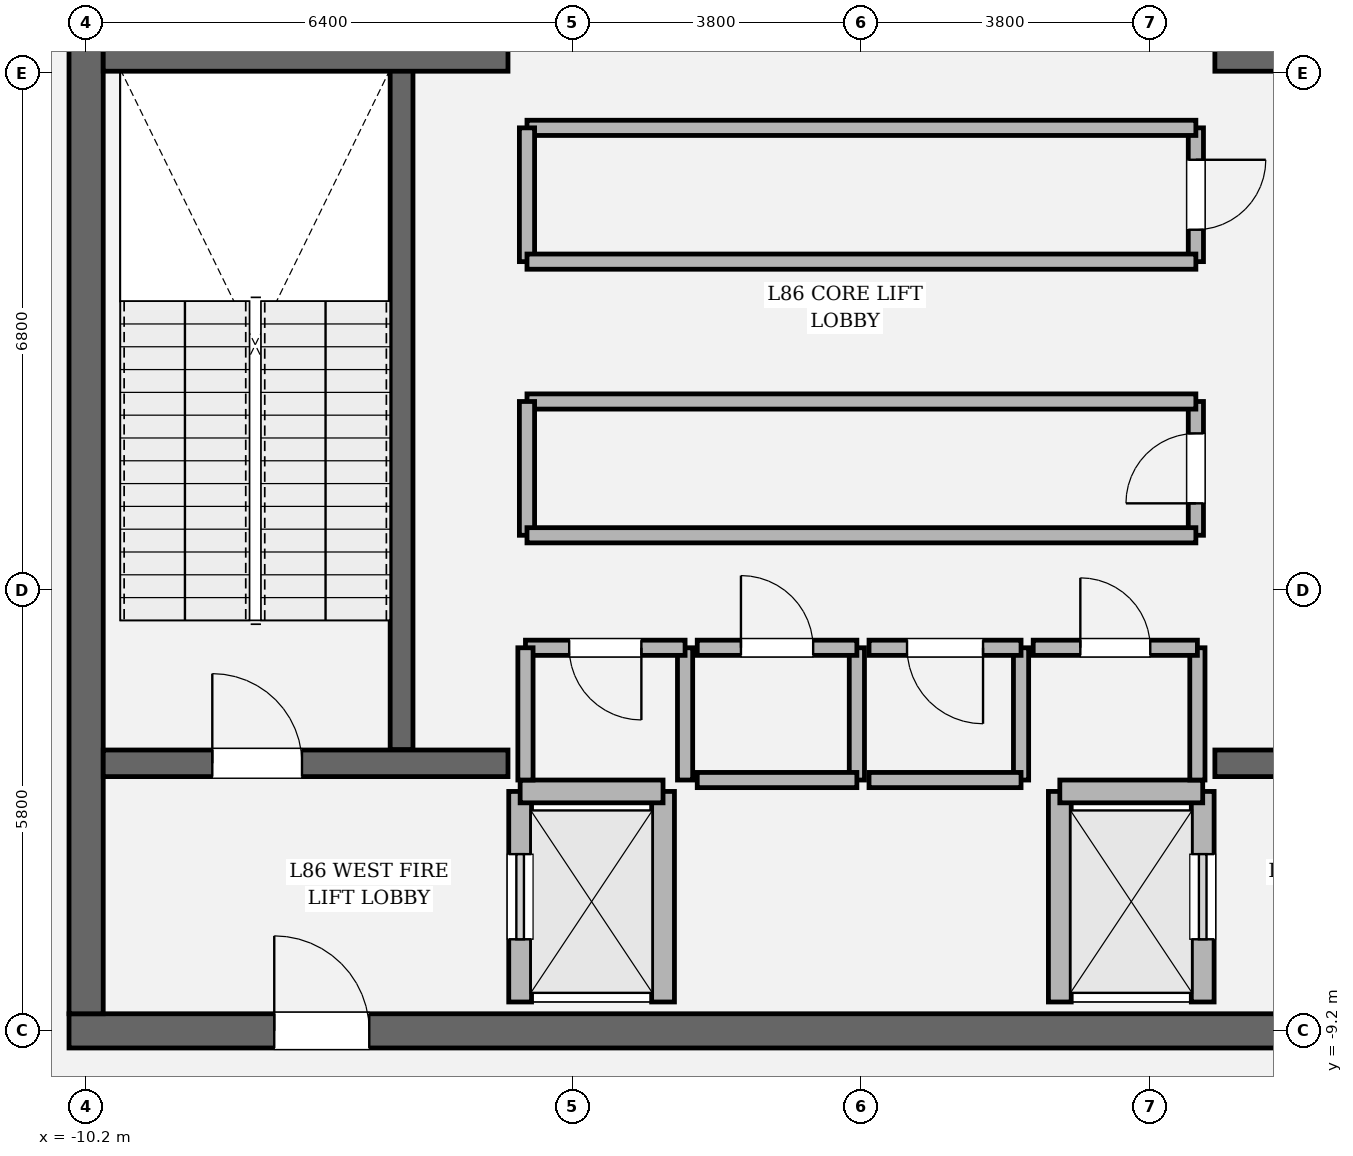
"""IFC4 building model, lengths in metres.
Left out: names, types, materials, properties, quantities, classifications, styles, units other than length and angle.
Written with IfcOpenShell. Run it as: python <this file> out.ifc"""

import sys

from ifc_helpers import new_model, si_unit, direction, frame, frame_2d, origin, place, context, subcontext, project, spatial, rectangle, extrude, element, fill, save


model = new_model("IFC4")
c1 = context("Model", 3, precision=1e-05, world=origin(), true_north=direction((0.0, 1.0)))
c2 = subcontext(c1, "Body", "Model", "MODEL_VIEW")
j1 = project(units=[si_unit("LENGTHUNIT", "METRE"), si_unit("PLANEANGLEUNIT", "RADIAN")], contexts=[c1])
p1 = place(None, origin())
s1 = spatial("IfcSite", under=j1, at=p1, CompositionType="ELEMENT")
p2 = place(p1, origin())
s2 = spatial("IfcBuilding", under=s1, at=p2, CompositionType="ELEMENT")
p3 = place(p2, frame((0.0, 0.0, 366.3)))
s3 = spatial("IfcBuildingStorey", under=s2, at=p3, CompositionType="ELEMENT", Elevation=366.3)
p4 = place(p3, frame((10.425, -9.2, 0.0), z_axis=(0.0, 0.0, 1.0), x_axis=(-1.0, 0.0, 0.0)))
e1 = element("IfcWall", 1, at=p4, inside=s3, PredefinedType="SHEAR", context=c2, shape_type="SweptSolid", body=[
    extrude(rectangle(XDim=20.85, YDim=0.45, at=frame_2d((10.425, 0.0))), origin(), (0.0, 0.0, 1.0), 4.5),
])
p5 = place(p4, frame((2.7, 0.0, 0.0)))
e2 = element("IfcOpeningElement", 2, at=p5, cuts=e1, PredefinedType="OPENING", context=c2, shape_type="SweptSolid", body=[
    extrude(rectangle(XDim=1.25, YDim=2.25, at=frame_2d((0.625, 1.125))), frame((0.0, 0.235, 0.0), z_axis=(0.0, -1.0, 0.0), x_axis=(1.0, 0.0, 0.0)), (0.0, 0.0, 1.0), 0.47),
])
p6 = place(p4, frame((16.9, 0.0, 0.0)))
e3 = element("IfcOpeningElement", 3, at=p6, cuts=e1, PredefinedType="OPENING", context=c2, shape_type="SweptSolid", body=[
    extrude(rectangle(XDim=1.25, YDim=2.25, at=frame_2d((0.625, 1.125))), frame((0.0, 0.235, 0.0), z_axis=(0.0, -1.0, 0.0), x_axis=(1.0, 0.0, 0.0)), (0.0, 0.0, 1.0), 0.47),
])
p7 = place(p3, frame((-10.2, -8.975, 0.0), z_axis=(0.0, 0.0, 1.0), x_axis=(0.0, 1.0, 0.0)))
e4 = element("IfcWall", 4, at=p7, inside=s3, PredefinedType="SHEAR", context=c2, shape_type="SweptSolid", body=[
    extrude(rectangle(XDim=17.95, YDim=0.45, at=frame_2d((8.975, 0.0))), origin(), (0.0, 0.0, 1.0), 4.5),
])
p8 = place(p7, frame((12.765, 0.0, 0.0)))
e5 = element("IfcOpeningElement", 5, at=p8, cuts=e4, PredefinedType="OPENING", context=c2, shape_type="SweptSolid", body=[
    extrude(rectangle(XDim=1.18, YDim=2.2, at=frame_2d((0.59, 1.1))), frame((0.0, 0.235, 0.0), z_axis=(0.0, -1.0, 0.0), x_axis=(1.0, 0.0, 0.0)), (0.0, 0.0, 1.0), 0.47),
])
p9 = place(p3, frame((-6.05, -5.5, 0.0), z_axis=(0.0, 0.0, 1.0), x_axis=(0.0, 1.0, 0.0)))
e6 = element("IfcWall", 6, at=p9, inside=s3, PredefinedType="SOLIDWALL", context=c2, shape_type="SweptSolid", body=[
    extrude(rectangle(XDim=8.95, YDim=0.3, at=frame_2d((4.475, 0.0))), origin(), (0.0, 0.0, 1.0), 4.5),
])
p10 = place(p3, frame((-9.975, -5.68, 0.0), z_axis=(0.0, 0.0, 1.0), x_axis=(1.0, 0.0, 0.0)))
e7 = element("IfcWall", 7, at=p10, inside=s3, PredefinedType="SOLIDWALL", context=c2, shape_type="SweptSolid", body=[
    extrude(rectangle(XDim=5.325, YDim=0.35, at=frame_2d((2.663, 0.0))), origin(), (0.0, 0.0, 1.0), 4.5),
])
p11 = place(p10, frame((1.435, 0.0, 0.0)))
e8 = element("IfcOpeningElement", 8, at=p11, cuts=e7, PredefinedType="OPENING", context=c2, shape_type="SweptSolid", body=[
    extrude(rectangle(XDim=1.18, YDim=2.2, at=frame_2d((0.59, 1.1))), frame((0.0, 0.185, 0.0), z_axis=(0.0, -1.0, 0.0), x_axis=(1.0, 0.0, 0.0)), (0.0, 0.0, 1.0), 0.37),
])
p12 = place(p3, frame((4.65, -5.68, 0.0), z_axis=(0.0, 0.0, 1.0), x_axis=(1.0, 0.0, 0.0)))
e9 = element("IfcWall", 9, at=p12, inside=s3, PredefinedType="SOLIDWALL", context=c2, shape_type="SweptSolid", body=[
    extrude(rectangle(XDim=5.325, YDim=0.35, at=frame_2d((2.663, 0.0))), origin(), (0.0, 0.0, 1.0), 4.5),
])
p13 = place(p12, frame((2.71, 0.0, 0.0)))
e10 = element("IfcOpeningElement", 10, at=p13, cuts=e9, PredefinedType="OPENING", context=c2, shape_type="SweptSolid", body=[
    extrude(rectangle(XDim=1.18, YDim=2.2, at=frame_2d((0.59, 1.1))), frame((0.0, 0.185, 0.0), z_axis=(0.0, -1.0, 0.0), x_axis=(1.0, 0.0, 0.0)), (0.0, 0.0, 1.0), 0.37),
])
for number, where, z_axis, x_axis in (
    (11, (-9.975, 3.6, 0.0), (0.0, 0.0, 1.0), (1.0, 0.0, 0.0)),
    (12, (4.65, 3.6, 0.0), (0.0, 0.0, 1.0), (1.0, 0.0, 0.0)),
):
    element("IfcWall", number, at=place(p3, frame(where, z_axis=z_axis, x_axis=x_axis)), inside=s3, PredefinedType="SOLIDWALL", context=c2, shape_type="SweptSolid", body=[
        extrude(rectangle(XDim=5.325, YDim=0.35, at=frame_2d((2.663, 0.0))), origin(), (0.0, 0.0, 1.0), 4.5),
    ])
p14 = place(p3, frame((-4.49, -8.82, 0.0), z_axis=(0.0, 0.0, 1.0), x_axis=(0.0, 1.0, 0.0)))
e13 = element("IfcWall", 13, at=p14, inside=s3, PredefinedType="SOLIDWALL", context=c2, shape_type="SweptSolid", body=[
    extrude(rectangle(XDim=2.77, YDim=0.3, at=frame_2d((1.385, 0.0))), origin(), (0.0, 0.0, 1.0), 4.25),
])
p15 = place(p14, frame((0.825, 0.0, 0.0)))
e14 = element("IfcOpeningElement", 14, at=p15, cuts=e13, PredefinedType="OPENING", context=c2, shape_type="SweptSolid", body=[
    extrude(rectangle(XDim=1.12, YDim=2.25, at=frame_2d((0.56, 1.125))), frame((0.0, 0.16, 0.0), z_axis=(0.0, -1.0, 0.0), x_axis=(1.0, 0.0, 0.0)), (0.0, 0.0, 1.0), 0.32),
])
p16 = place(p3, frame((-2.61, -8.82, 0.0), z_axis=(0.0, 0.0, 1.0), x_axis=(0.0, 1.0, 0.0)))
e15 = element("IfcWall", 15, at=p16, inside=s3, PredefinedType="SOLIDWALL", context=c2, shape_type="SweptSolid", body=[
    extrude(rectangle(XDim=2.77, YDim=0.3, at=frame_2d((1.385, 0.0))), origin(), (0.0, 0.0, 1.0), 4.25),
])
p17 = place(p3, frame((-4.49, -6.05, 0.0), z_axis=(0.0, 0.0, 1.0), x_axis=(1.0, 0.0, 0.0)))
e16 = element("IfcWall", 16, at=p17, inside=s3, PredefinedType="SOLIDWALL", context=c2, shape_type="SweptSolid", body=[
    extrude(rectangle(XDim=1.88, YDim=0.3, at=frame_2d((0.94, 0.0))), origin(), (0.0, 0.0, 1.0), 4.25),
])
p18 = place(p3, frame((4.49, -8.82, 0.0), z_axis=(0.0, 0.0, 1.0), x_axis=(0.0, 1.0, 0.0)))
e17 = element("IfcWall", 17, at=p18, inside=s3, PredefinedType="SOLIDWALL", context=c2, shape_type="SweptSolid", body=[
    extrude(rectangle(XDim=2.77, YDim=0.3, at=frame_2d((1.385, 0.0))), origin(), (0.0, 0.0, 1.0), 4.25),
])
p19 = place(p18, frame((0.825, 0.0, 0.0)))
e18 = element("IfcOpeningElement", 18, at=p19, cuts=e17, PredefinedType="OPENING", context=c2, shape_type="SweptSolid", body=[
    extrude(rectangle(XDim=1.12, YDim=2.25, at=frame_2d((0.56, 1.125))), frame((0.0, 0.16, 0.0), z_axis=(0.0, -1.0, 0.0), x_axis=(1.0, 0.0, 0.0)), (0.0, 0.0, 1.0), 0.32),
])
p20 = place(p3, frame((2.61, -8.82, 0.0), z_axis=(0.0, 0.0, 1.0), x_axis=(0.0, 1.0, 0.0)))
e19 = element("IfcWall", 19, at=p20, inside=s3, PredefinedType="SOLIDWALL", context=c2, shape_type="SweptSolid", body=[
    extrude(rectangle(XDim=2.77, YDim=0.3, at=frame_2d((1.385, 0.0))), origin(), (0.0, 0.0, 1.0), 4.25),
])
p21 = place(p3, frame((2.61, -6.05, 0.0), z_axis=(0.0, 0.0, 1.0), x_axis=(1.0, 0.0, 0.0)))
e20 = element("IfcWall", 20, at=p21, inside=s3, PredefinedType="SOLIDWALL", context=c2, shape_type="SweptSolid", body=[
    extrude(rectangle(XDim=1.88, YDim=0.3, at=frame_2d((0.94, 0.0))), origin(), (0.0, 0.0, 1.0), 4.25),
])
p22 = place(p3, frame((-2.32, -5.9, 0.0), z_axis=(0.0, 0.0, 1.0), x_axis=(0.0, 1.0, 0.0)))
e21 = element("IfcWall", 21, at=p22, inside=s3, PredefinedType="SOLIDWALL", context=c2, shape_type="SweptSolid", body=[
    extrude(rectangle(XDim=1.74, YDim=0.2, at=frame_2d((0.87, 0.0))), origin(), (0.0, 0.0, 1.0), 4.25),
])
p23 = place(p3, frame((-2.32, -4.16, 0.0), z_axis=(0.0, 0.0, 1.0), x_axis=(-1.0, 0.0, 0.0)))
e22 = element("IfcWall", 22, at=p23, inside=s3, PredefinedType="SOLIDWALL", context=c2, shape_type="SweptSolid", body=[
    extrude(rectangle(XDim=2.1, YDim=0.2, at=frame_2d((1.05, 0.0))), origin(), (0.0, 0.0, 1.0), 4.25),
])
p24 = place(p23, frame((0.575, 0.0, 0.0)))
e23 = element("IfcOpeningElement", 23, at=p24, cuts=e22, PredefinedType="OPENING", context=c2, shape_type="SweptSolid", body=[
    extrude(rectangle(XDim=0.95, YDim=2.15, at=frame_2d((0.475, 1.075))), frame((0.0, 0.11, 0.0), z_axis=(0.0, -1.0, 0.0), x_axis=(1.0, 0.0, 0.0)), (0.0, 0.0, 1.0), 0.22),
])
for number, where, z_axis, x_axis in (
    (24, (-4.42, -4.16, 0.0), (0.0, 0.0, 1.0), (0.0, -1.0, 0.0)),
    (25, (-0.06, -5.9, 0.0), (0.0, 0.0, 1.0), (0.0, 1.0, 0.0)),
):
    element("IfcWall", number, at=place(p3, frame(where, z_axis=z_axis, x_axis=x_axis)), inside=s3, PredefinedType="SOLIDWALL", context=c2, shape_type="SweptSolid", body=[
        extrude(rectangle(XDim=1.74, YDim=0.2, at=frame_2d((0.87, 0.0))), origin(), (0.0, 0.0, 1.0), 4.25),
    ])
p25 = place(p3, frame((-0.06, -4.16, 0.0), z_axis=(0.0, 0.0, 1.0), x_axis=(-1.0, 0.0, 0.0)))
e26 = element("IfcWall", 26, at=p25, inside=s3, PredefinedType="SOLIDWALL", context=c2, shape_type="SweptSolid", body=[
    extrude(rectangle(XDim=2.1, YDim=0.2, at=frame_2d((1.05, 0.0))), origin(), (0.0, 0.0, 1.0), 4.25),
])
p26 = place(p25, frame((0.575, 0.0, 0.0)))
e27 = element("IfcOpeningElement", 27, at=p26, cuts=e26, PredefinedType="OPENING", context=c2, shape_type="SweptSolid", body=[
    extrude(rectangle(XDim=0.95, YDim=2.15, at=frame_2d((0.475, 1.075))), frame((0.0, 0.11, 0.0), z_axis=(0.0, -1.0, 0.0), x_axis=(1.0, 0.0, 0.0)), (0.0, 0.0, 1.0), 0.22),
])
p27 = place(p3, frame((-2.16, -5.9, 0.0), z_axis=(0.0, 0.0, 1.0), x_axis=(1.0, 0.0, 0.0)))
e28 = element("IfcWall", 28, at=p27, inside=s3, PredefinedType="SOLIDWALL", context=c2, shape_type="SweptSolid", body=[
    extrude(rectangle(XDim=2.1, YDim=0.2, at=frame_2d((1.05, 0.0))), origin(), (0.0, 0.0, 1.0), 4.25),
])
p28 = place(p3, frame((2.1, -5.9, 0.0), z_axis=(0.0, 0.0, 1.0), x_axis=(0.0, 1.0, 0.0)))
e29 = element("IfcWall", 29, at=p28, inside=s3, PredefinedType="SOLIDWALL", context=c2, shape_type="SweptSolid", body=[
    extrude(rectangle(XDim=1.74, YDim=0.2, at=frame_2d((0.87, 0.0))), origin(), (0.0, 0.0, 1.0), 4.25),
])
p29 = place(p3, frame((2.1, -4.16, 0.0), z_axis=(0.0, 0.0, 1.0), x_axis=(-1.0, 0.0, 0.0)))
e30 = element("IfcWall", 30, at=p29, inside=s3, PredefinedType="SOLIDWALL", context=c2, shape_type="SweptSolid", body=[
    extrude(rectangle(XDim=2.0, YDim=0.2, at=frame_2d((1.0, 0.0))), origin(), (0.0, 0.0, 1.0), 4.25),
])
p30 = place(p29, frame((0.5, 0.0, 0.0)))
e31 = element("IfcOpeningElement", 31, at=p30, cuts=e30, PredefinedType="OPENING", context=c2, shape_type="SweptSolid", body=[
    extrude(rectangle(XDim=1.0, YDim=2.15, at=frame_2d((0.5, 1.075))), frame((0.0, 0.11, 0.0), z_axis=(0.0, -1.0, 0.0), x_axis=(1.0, 0.0, 0.0)), (0.0, 0.0, 1.0), 0.22),
])
p31 = place(p3, frame((0.1, -5.9, 0.0), z_axis=(0.0, 0.0, 1.0), x_axis=(1.0, 0.0, 0.0)))
e32 = element("IfcWall", 32, at=p31, inside=s3, PredefinedType="SOLIDWALL", context=c2, shape_type="SweptSolid", body=[
    extrude(rectangle(XDim=2.0, YDim=0.2, at=frame_2d((1.0, 0.0))), origin(), (0.0, 0.0, 1.0), 4.25),
])
p32 = place(p3, frame((4.42, -5.9, 0.0), z_axis=(0.0, 0.0, 1.0), x_axis=(0.0, 1.0, 0.0)))
e33 = element("IfcWall", 33, at=p32, inside=s3, PredefinedType="SOLIDWALL", context=c2, shape_type="SweptSolid", body=[
    extrude(rectangle(XDim=1.74, YDim=0.2, at=frame_2d((0.87, 0.0))), origin(), (0.0, 0.0, 1.0), 4.25),
])
p33 = place(p3, frame((4.42, -4.16, 0.0), z_axis=(0.0, 0.0, 1.0), x_axis=(-1.0, 0.0, 0.0)))
e34 = element("IfcWall", 34, at=p33, inside=s3, PredefinedType="SOLIDWALL", context=c2, shape_type="SweptSolid", body=[
    extrude(rectangle(XDim=2.16, YDim=0.2, at=frame_2d((1.08, 0.0))), origin(), (0.0, 0.0, 1.0), 4.25),
])
p34 = place(p33, frame((0.62, 0.0, 0.0)))
e35 = element("IfcOpeningElement", 35, at=p34, cuts=e34, PredefinedType="OPENING", context=c2, shape_type="SweptSolid", body=[
    extrude(rectangle(XDim=0.92, YDim=2.1, at=frame_2d((0.46, 1.05))), frame((0.0, 0.11, 0.0), z_axis=(0.0, -1.0, 0.0), x_axis=(1.0, 0.0, 0.0)), (0.0, 0.0, 1.0), 0.22),
])
p35 = place(p3, frame((4.4, -2.68, 0.0), z_axis=(0.0, 0.0, 1.0), x_axis=(0.0, 1.0, 0.0)))
e36 = element("IfcWall", 36, at=p35, inside=s3, PredefinedType="SOLIDWALL", context=c2, shape_type="SweptSolid", body=[
    extrude(rectangle(XDim=1.76, YDim=0.2, at=frame_2d((0.88, 0.0))), origin(), (0.0, 0.0, 1.0), 4.25),
])
p36 = place(p35, frame((0.42, 0.0, 0.0)))
e37 = element("IfcOpeningElement", 37, at=p36, cuts=e36, PredefinedType="OPENING", context=c2, shape_type="SweptSolid", body=[
    extrude(rectangle(XDim=0.92, YDim=2.1, at=frame_2d((0.46, 1.05))), frame((0.0, 0.11, 0.0), z_axis=(0.0, -1.0, 0.0), x_axis=(1.0, 0.0, 0.0)), (0.0, 0.0, 1.0), 0.22),
])
p37 = place(p3, frame((4.4, -0.92, 0.0), z_axis=(0.0, 0.0, 1.0), x_axis=(-1.0, 0.0, 0.0)))
e38 = element("IfcWall", 38, at=p37, inside=s3, PredefinedType="SOLIDWALL", context=c2, shape_type="SweptSolid", body=[
    extrude(rectangle(XDim=8.8, YDim=0.2, at=frame_2d((4.4, 0.0))), origin(), (0.0, 0.0, 1.0), 4.25),
])
p38 = place(p3, frame((-4.4, -0.92, 0.0), z_axis=(0.0, 0.0, 1.0), x_axis=(0.0, -1.0, 0.0)))
e39 = element("IfcWall", 39, at=p38, inside=s3, PredefinedType="SOLIDWALL", context=c2, shape_type="SweptSolid", body=[
    extrude(rectangle(XDim=1.76, YDim=0.2, at=frame_2d((0.88, 0.0))), origin(), (0.0, 0.0, 1.0), 4.25),
])
p39 = place(p3, frame((-4.4, -2.68, 0.0), z_axis=(0.0, 0.0, 1.0), x_axis=(1.0, 0.0, 0.0)))
e40 = element("IfcWall", 40, at=p39, inside=s3, PredefinedType="SOLIDWALL", context=c2, shape_type="SweptSolid", body=[
    extrude(rectangle(XDim=8.8, YDim=0.2, at=frame_2d((4.4, 0.0))), origin(), (0.0, 0.0, 1.0), 4.25),
])
p40 = place(p3, frame((4.4, 0.92, 0.0), z_axis=(0.0, 0.0, 1.0), x_axis=(0.0, 1.0, 0.0)))
e41 = element("IfcWall", 41, at=p40, inside=s3, PredefinedType="SOLIDWALL", context=c2, shape_type="SweptSolid", body=[
    extrude(rectangle(XDim=1.76, YDim=0.2, at=frame_2d((0.88, 0.0))), origin(), (0.0, 0.0, 1.0), 4.25),
])
p41 = place(p40, frame((0.42, 0.0, 0.0)))
e42 = element("IfcOpeningElement", 42, at=p41, cuts=e41, PredefinedType="OPENING", context=c2, shape_type="SweptSolid", body=[
    extrude(rectangle(XDim=0.92, YDim=2.1, at=frame_2d((0.46, 1.05))), frame((0.0, 0.11, 0.0), z_axis=(0.0, -1.0, 0.0), x_axis=(1.0, 0.0, 0.0)), (0.0, 0.0, 1.0), 0.22),
])
p42 = place(p3, frame((4.4, 2.68, 0.0), z_axis=(0.0, 0.0, 1.0), x_axis=(-1.0, 0.0, 0.0)))
e43 = element("IfcWall", 43, at=p42, inside=s3, PredefinedType="SOLIDWALL", context=c2, shape_type="SweptSolid", body=[
    extrude(rectangle(XDim=8.8, YDim=0.2, at=frame_2d((4.4, 0.0))), origin(), (0.0, 0.0, 1.0), 4.25),
])
p43 = place(p3, frame((-4.4, 2.68, 0.0), z_axis=(0.0, 0.0, 1.0), x_axis=(0.0, -1.0, 0.0)))
e44 = element("IfcWall", 44, at=p43, inside=s3, PredefinedType="SOLIDWALL", context=c2, shape_type="SweptSolid", body=[
    extrude(rectangle(XDim=1.76, YDim=0.2, at=frame_2d((0.88, 0.0))), origin(), (0.0, 0.0, 1.0), 4.25),
])
p44 = place(p3, frame((-4.4, 0.92, 0.0), z_axis=(0.0, 0.0, 1.0), x_axis=(1.0, 0.0, 0.0)))
e45 = element("IfcWall", 45, at=p44, inside=s3, PredefinedType="SOLIDWALL", context=c2, shape_type="SweptSolid", body=[
    extrude(rectangle(XDim=8.8, YDim=0.2, at=frame_2d((4.4, 0.0))), origin(), (0.0, 0.0, 1.0), 4.25),
])
p45 = place(p11, origin())
e46 = element("IfcDoor", 46, at=p45, inside=s3, OperationType="SINGLE_SWING_LEFT", PredefinedType="DOOR", context=c2, shape_type="SweptSolid", body=[
    extrude(rectangle(XDim=1.18, YDim=2.2, at=frame_2d((0.59, 1.1))), frame((0.0, 0.025, 0.0), z_axis=(0.0, -1.0, 0.0), x_axis=(1.0, 0.0, 0.0)), (0.0, 0.0, 1.0), 0.05),
])
fill(e8, e46)
p46 = place(p6, origin())
e47 = element("IfcDoor", 47, at=p46, inside=s3, OperationType="SINGLE_SWING_RIGHT", PredefinedType="DOOR", context=c2, shape_type="SweptSolid", body=[
    extrude(rectangle(XDim=1.25, YDim=2.25, at=frame_2d((0.625, 1.125))), frame((0.0, 0.025, 0.0), z_axis=(0.0, -1.0, 0.0), x_axis=(1.0, 0.0, 0.0)), (0.0, 0.0, 1.0), 0.05),
])
fill(e3, e47)
p47 = place(p15, origin())
e48 = element("IfcDoor", 48, at=p47, inside=s3, OperationType="SLIDING_TO_LEFT", PredefinedType="DOOR", context=c2, shape_type="SweptSolid", body=[
    extrude(rectangle(XDim=1.12, YDim=2.25, at=frame_2d((0.56, 1.125))), frame((0.0, 0.025, 0.0), z_axis=(0.0, -1.0, 0.0), x_axis=(1.0, 0.0, 0.0)), (0.0, 0.0, 1.0), 0.05),
])
fill(e14, e48)
p48 = place(p19, origin())
e49 = element("IfcDoor", 49, at=p48, inside=s3, OperationType="SLIDING_TO_RIGHT", PredefinedType="DOOR", context=c2, shape_type="SweptSolid", body=[
    extrude(rectangle(XDim=1.12, YDim=2.25, at=frame_2d((0.56, 1.125))), frame((0.0, 0.025, 0.0), z_axis=(0.0, -1.0, 0.0), x_axis=(1.0, 0.0, 0.0)), (0.0, 0.0, 1.0), 0.05),
])
fill(e18, e49)
p49 = place(p24, origin())
e50 = element("IfcDoor", 50, at=p49, inside=s3, OperationType="SINGLE_SWING_LEFT", PredefinedType="DOOR", context=c2, shape_type="SweptSolid", body=[
    extrude(rectangle(XDim=0.95, YDim=2.15, at=frame_2d((0.475, 1.075))), frame((0.0, 0.025, 0.0), z_axis=(0.0, -1.0, 0.0), x_axis=(1.0, 0.0, 0.0)), (0.0, 0.0, 1.0), 0.05),
])
fill(e23, e50)
p50 = place(p26, origin())
e51 = element("IfcDoor", 51, at=p50, inside=s3, OperationType="SINGLE_SWING_RIGHT", PredefinedType="DOOR", context=c2, shape_type="SweptSolid", body=[
    extrude(rectangle(XDim=0.95, YDim=2.15, at=frame_2d((0.475, 1.075))), frame((0.0, 0.025, 0.0), z_axis=(0.0, -1.0, 0.0), x_axis=(1.0, 0.0, 0.0)), (0.0, 0.0, 1.0), 0.05),
])
fill(e27, e51)
p51 = place(p30, origin())
e52 = element("IfcDoor", 52, at=p51, inside=s3, OperationType="SINGLE_SWING_LEFT", PredefinedType="DOOR", context=c2, shape_type="SweptSolid", body=[
    extrude(rectangle(XDim=1.0, YDim=2.15, at=frame_2d((0.5, 1.075))), frame((0.0, 0.025, 0.0), z_axis=(0.0, -1.0, 0.0), x_axis=(1.0, 0.0, 0.0)), (0.0, 0.0, 1.0), 0.05),
])
fill(e31, e52)
p52 = place(p34, origin())
e53 = element("IfcDoor", 53, at=p52, inside=s3, OperationType="SINGLE_SWING_RIGHT", PredefinedType="DOOR", context=c2, shape_type="SweptSolid", body=[
    extrude(rectangle(XDim=0.92, YDim=2.1, at=frame_2d((0.46, 1.05))), frame((0.0, 0.025, 0.0), z_axis=(0.0, -1.0, 0.0), x_axis=(1.0, 0.0, 0.0)), (0.0, 0.0, 1.0), 0.05),
])
fill(e35, e53)
p53 = place(p36, origin())
e54 = element("IfcDoor", 54, at=p53, inside=s3, OperationType="SINGLE_SWING_LEFT", PredefinedType="DOOR", context=c2, shape_type="SweptSolid", body=[
    extrude(rectangle(XDim=0.92, YDim=2.1, at=frame_2d((0.46, 1.05))), frame((0.0, 0.025, 0.0), z_axis=(0.0, -1.0, 0.0), x_axis=(1.0, 0.0, 0.0)), (0.0, 0.0, 1.0), 0.05),
])
fill(e37, e54)
p54 = place(p41, origin())
e55 = element("IfcDoor", 55, at=p54, inside=s3, OperationType="SINGLE_SWING_RIGHT", PredefinedType="DOOR", context=c2, shape_type="SweptSolid", body=[
    extrude(rectangle(XDim=0.92, YDim=2.1, at=frame_2d((0.46, 1.05))), frame((0.0, 0.025, 0.0), z_axis=(0.0, -1.0, 0.0), x_axis=(1.0, 0.0, 0.0)), (0.0, 0.0, 1.0), 0.05),
])
fill(e42, e55)
save(model, sys.argv[1])
